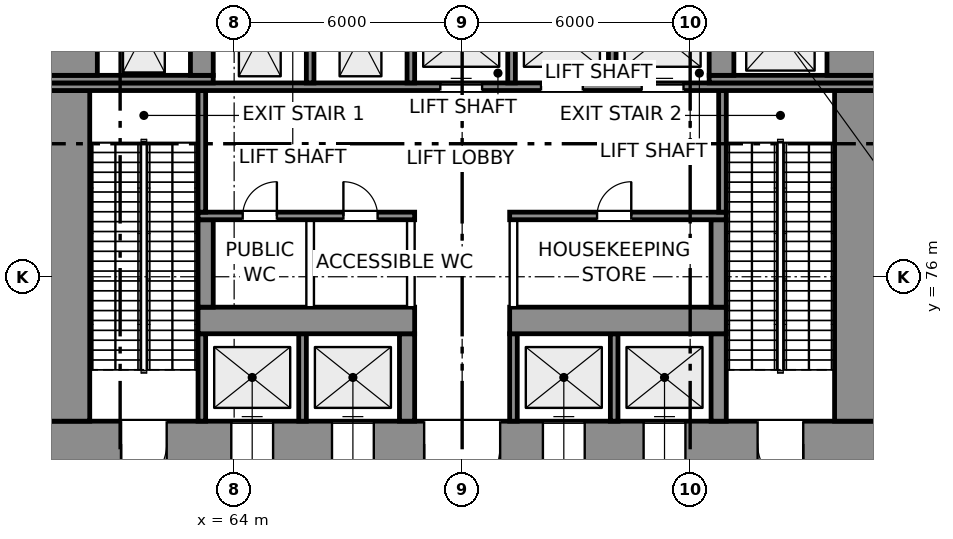
"""IFC4 building model, lengths in metres.
Left out: names, types, materials, properties, quantities, classifications, styles, units other than length and angle.
Written with IfcOpenShell. Run it as: python <this file> out.ifc"""

import sys

from ifc_helpers import new_model, si_unit, direction, frame, frame_2d, origin, place, context, subcontext, project, spatial, rectangle, extrude, element, fill, save


model = new_model("IFC4")
c1 = context("Model", 3, precision=1e-05, world=origin(), true_north=direction((0.0, 1.0)))
c2 = subcontext(c1, "Body", "Model", "MODEL_VIEW")
j1 = project(units=[si_unit("LENGTHUNIT", "METRE"), si_unit("PLANEANGLEUNIT", "RADIAN")], contexts=[c1])
p1 = place(None, origin())
s1 = spatial("IfcSite", under=j1, at=p1, CompositionType="ELEMENT")
p2 = place(p1, origin())
s2 = spatial("IfcBuilding", under=s1, at=p2, CompositionType="ELEMENT")
p3 = place(p2, origin())
s3 = spatial("IfcBuildingStorey", under=s2, at=p3, CompositionType="ELEMENT", Elevation=0.0)
p4 = place(p3, frame((59.0, 71.6, 0.0), z_axis=(0.0, 0.0, 1.0), x_axis=(1.0, 0.0, 0.0)))
e1 = element("IfcWall", 1, at=p4, inside=s3, PredefinedType="SHEAR", context=c2, shape_type="SweptSolid", body=[
    extrude(rectangle(XDim=22.0, YDim=1.2, at=frame_2d((11.0, 0.0))), origin(), (0.0, 0.0, 1.0), 9.0),
])
p5 = place(p4, frame((2.025, 0.0, 0.0)))
e2 = element("IfcOpeningElement", 2, at=p5, cuts=e1, PredefinedType="OPENING", context=c2, shape_type="SweptSolid", body=[
    extrude(rectangle(XDim=1.2, YDim=2.1, at=frame_2d((0.6, 1.05))), frame((0.0, 0.61, 0.0), z_axis=(0.0, -1.0, 0.0), x_axis=(1.0, 0.0, 0.0)), (0.0, 0.0, 1.0), 1.22),
])
p6 = place(p4, frame((18.775, 0.0, 0.0)))
e3 = element("IfcOpeningElement", 3, at=p6, cuts=e1, PredefinedType="OPENING", context=c2, shape_type="SweptSolid", body=[
    extrude(rectangle(XDim=1.2, YDim=2.1, at=frame_2d((0.6, 1.05))), frame((0.0, 0.61, 0.0), z_axis=(0.0, -1.0, 0.0), x_axis=(1.0, 0.0, 0.0)), (0.0, 0.0, 1.0), 1.22),
])
p7 = place(p4, frame((10.0, 0.0, 0.0)))
e4 = element("IfcOpeningElement", 4, at=p7, cuts=e1, PredefinedType="OPENING", context=c2, shape_type="SweptSolid", body=[
    extrude(rectangle(XDim=2.0, YDim=2.1, at=frame_2d((1.0, 1.05))), frame((0.0, 0.61, 0.0), z_axis=(0.0, -1.0, 0.0), x_axis=(1.0, 0.0, 0.0)), (0.0, 0.0, 1.0), 1.22),
])
p8 = place(p4, frame((4.925, 0.0, 0.0)))
e5 = element("IfcOpeningElement", 5, at=p8, cuts=e1, PredefinedType="OPENING", context=c2, shape_type="SweptSolid", body=[
    extrude(rectangle(XDim=1.1, YDim=2.1, at=frame_2d((0.55, 1.05))), frame((0.0, 0.61, 0.0), z_axis=(0.0, -1.0, 0.0), x_axis=(1.0, 0.0, 0.0)), (0.0, 0.0, 1.0), 1.22),
])
p9 = place(p4, frame((7.575, 0.0, 0.0)))
e6 = element("IfcOpeningElement", 6, at=p9, cuts=e1, PredefinedType="OPENING", context=c2, shape_type="SweptSolid", body=[
    extrude(rectangle(XDim=1.1, YDim=2.1, at=frame_2d((0.55, 1.05))), frame((0.0, 0.61, 0.0), z_axis=(0.0, -1.0, 0.0), x_axis=(1.0, 0.0, 0.0)), (0.0, 0.0, 1.0), 1.22),
])
p10 = place(p4, frame((13.125, 0.0, 0.0)))
e7 = element("IfcOpeningElement", 7, at=p10, cuts=e1, PredefinedType="OPENING", context=c2, shape_type="SweptSolid", body=[
    extrude(rectangle(XDim=1.1, YDim=2.1, at=frame_2d((0.55, 1.05))), frame((0.0, 0.61, 0.0), z_axis=(0.0, -1.0, 0.0), x_axis=(1.0, 0.0, 0.0)), (0.0, 0.0, 1.0), 1.22),
])
p11 = place(p4, frame((15.775, 0.0, 0.0)))
e8 = element("IfcOpeningElement", 8, at=p11, cuts=e1, PredefinedType="OPENING", context=c2, shape_type="SweptSolid", body=[
    extrude(rectangle(XDim=1.1, YDim=2.1, at=frame_2d((0.55, 1.05))), frame((0.0, 0.61, 0.0), z_axis=(0.0, -1.0, 0.0), x_axis=(1.0, 0.0, 0.0)), (0.0, 0.0, 1.0), 1.22),
])
p12 = place(p3, frame((59.6, 72.2, 0.0), z_axis=(0.0, 0.0, 1.0), x_axis=(0.0, 1.0, 0.0)))
e9 = element("IfcWall", 9, at=p12, inside=s3, PredefinedType="SHEAR", context=c2, shape_type="SweptSolid", body=[
    extrude(rectangle(XDim=8.7, YDim=1.2, at=frame_2d((4.35, 0.0))), origin(), (0.0, 0.0, 1.0), 9.0),
])
for number, where, z_axis, x_axis in (
    (10, (63.15, 72.2, 0.0), (0.0, 0.0, 1.0), (0.0, 1.0, 0.0)),
    (11, (65.8, 72.2, 0.0), (0.0, 0.0, 1.0), (0.0, 1.0, 0.0)),
):
    element("IfcWall", number, at=place(p3, frame(where, z_axis=z_axis, x_axis=x_axis)), inside=s3, PredefinedType="SHEAR", context=c2, shape_type="SweptSolid", body=[
        extrude(rectangle(XDim=2.3, YDim=0.2, at=frame_2d((1.15, 0.0))), origin(), (0.0, 0.0, 1.0), 9.0),
    ])
p13 = place(p3, frame((68.55, 72.2, 0.0), z_axis=(0.0, 0.0, 1.0), x_axis=(0.0, 1.0, 0.0)))
e12 = element("IfcWall", 12, at=p13, inside=s3, PredefinedType="SHEAR", context=c2, shape_type="SweptSolid", body=[
    extrude(rectangle(XDim=2.3, YDim=0.4, at=frame_2d((1.15, 0.0))), origin(), (0.0, 0.0, 1.0), 9.0),
])
for number, where, z_axis, x_axis in (
    (13, (71.35, 72.2, 0.0), (0.0, 0.0, 1.0), (0.0, 1.0, 0.0)),
    (14, (74.0, 72.2, 0.0), (0.0, 0.0, 1.0), (0.0, 1.0, 0.0)),
):
    element("IfcWall", number, at=place(p3, frame(where, z_axis=z_axis, x_axis=x_axis)), inside=s3, PredefinedType="SHEAR", context=c2, shape_type="SweptSolid", body=[
        extrude(rectangle(XDim=2.3, YDim=0.2, at=frame_2d((1.15, 0.0))), origin(), (0.0, 0.0, 1.0), 9.0),
    ])
p14 = place(p3, frame((76.75, 72.2, 0.0), z_axis=(0.0, 0.0, 1.0), x_axis=(0.0, 1.0, 0.0)))
e15 = element("IfcWall", 15, at=p14, inside=s3, PredefinedType="SHEAR", context=c2, shape_type="SweptSolid", body=[
    extrude(rectangle(XDim=2.3, YDim=0.4, at=frame_2d((1.15, 0.0))), origin(), (0.0, 0.0, 1.0), 9.0),
])
p15 = place(p3, frame((80.4, 72.2, 0.0), z_axis=(0.0, 0.0, 1.0), x_axis=(0.0, 1.0, 0.0)))
e16 = element("IfcWall", 16, at=p15, inside=s3, PredefinedType="SHEAR", context=c2, shape_type="SweptSolid", body=[
    extrude(rectangle(XDim=8.7, YDim=1.2, at=frame_2d((4.35, 0.0))), origin(), (0.0, 0.0, 1.0), 9.0),
])
for number, where, z_axis, x_axis in (
    (17, (63.05, 74.85, 0.0), (0.0, 0.0, 1.0), (1.0, 0.0, 0.0)),
    (18, (71.25, 74.85, 0.0), (0.0, 0.0, 1.0), (1.0, 0.0, 0.0)),
):
    element("IfcWall", number, at=place(p3, frame(where, z_axis=z_axis, x_axis=x_axis)), inside=s3, PredefinedType="SHEAR", context=c2, shape_type="SweptSolid", body=[
        extrude(rectangle(XDim=5.7, YDim=0.7, at=frame_2d((2.85, 0.0))), origin(), (0.0, 0.0, 1.0), 9.0),
    ])
p16 = place(p3, frame((63.25, 75.2, 0.0), z_axis=(0.0, 0.0, 1.0), x_axis=(0.0, 1.0, 0.0)))
e19 = element("IfcWall", 19, at=p16, inside=s3, PredefinedType="SHEAR", context=c2, shape_type="SweptSolid", body=[
    extrude(rectangle(XDim=2.3, YDim=0.4, at=frame_2d((1.15, 0.0))), origin(), (0.0, 0.0, 1.0), 9.0),
])
for number, where, z_axis, x_axis in (
    (20, (66.0, 75.2, 0.0), (0.0, 0.0, 1.0), (0.0, 1.0, 0.0)),
    (21, (68.65, 75.2, 0.0), (0.0, 0.0, 1.0), (0.0, 1.0, 0.0)),
    (22, (71.35, 75.2, 0.0), (0.0, 0.0, 1.0), (0.0, 1.0, 0.0)),
):
    element("IfcWall", number, at=place(p3, frame(where, z_axis=z_axis, x_axis=x_axis)), inside=s3, PredefinedType="PARTITIONING", context=c2, shape_type="SweptSolid", body=[
        extrude(rectangle(XDim=2.3, YDim=0.2, at=frame_2d((1.15, 0.0))), origin(), (0.0, 0.0, 1.0), 8.65),
    ])
p17 = place(p3, frame((76.75, 75.2, 0.0), z_axis=(0.0, 0.0, 1.0), x_axis=(0.0, 1.0, 0.0)))
e23 = element("IfcWall", 23, at=p17, inside=s3, PredefinedType="SHEAR", context=c2, shape_type="SweptSolid", body=[
    extrude(rectangle(XDim=2.3, YDim=0.4, at=frame_2d((1.15, 0.0))), origin(), (0.0, 0.0, 1.0), 9.0),
])
p18 = place(p3, frame((63.05, 77.6, 0.0), z_axis=(0.0, 0.0, 1.0), x_axis=(1.0, 0.0, 0.0)))
e24 = element("IfcWall", 24, at=p18, inside=s3, PredefinedType="SHEAR", context=c2, shape_type="SweptSolid", body=[
    extrude(rectangle(XDim=5.7, YDim=0.2, at=frame_2d((2.85, 0.0))), origin(), (0.0, 0.0, 1.0), 9.0),
])
p19 = place(p18, frame((1.175, 0.0, 0.0)))
e25 = element("IfcOpeningElement", 25, at=p19, cuts=e24, PredefinedType="OPENING", context=c2, shape_type="SweptSolid", body=[
    extrude(rectangle(XDim=0.9, YDim=2.1, at=frame_2d((0.45, 1.05))), frame((0.0, 0.11, 0.0), z_axis=(0.0, -1.0, 0.0), x_axis=(1.0, 0.0, 0.0)), (0.0, 0.0, 1.0), 0.22),
])
p20 = place(p18, frame((3.825, 0.0, 0.0)))
e26 = element("IfcOpeningElement", 26, at=p20, cuts=e24, PredefinedType="OPENING", context=c2, shape_type="SweptSolid", body=[
    extrude(rectangle(XDim=0.9, YDim=2.1, at=frame_2d((0.45, 1.05))), frame((0.0, 0.11, 0.0), z_axis=(0.0, -1.0, 0.0), x_axis=(1.0, 0.0, 0.0)), (0.0, 0.0, 1.0), 0.22),
])
p21 = place(p3, frame((71.25, 77.6, 0.0), z_axis=(0.0, 0.0, 1.0), x_axis=(1.0, 0.0, 0.0)))
e27 = element("IfcWall", 27, at=p21, inside=s3, PredefinedType="SHEAR", context=c2, shape_type="SweptSolid", body=[
    extrude(rectangle(XDim=5.7, YDim=0.2, at=frame_2d((2.85, 0.0))), origin(), (0.0, 0.0, 1.0), 9.0),
])
p22 = place(p21, frame((2.3, 0.0, 0.0)))
e28 = element("IfcOpeningElement", 28, at=p22, cuts=e27, PredefinedType="OPENING", context=c2, shape_type="SweptSolid", body=[
    extrude(rectangle(XDim=0.9, YDim=2.1, at=frame_2d((0.45, 1.05))), frame((0.0, 0.11, 0.0), z_axis=(0.0, -1.0, 0.0), x_axis=(1.0, 0.0, 0.0)), (0.0, 0.0, 1.0), 0.22),
])
for number, where, z_axis, x_axis in (
    (29, (63.15, 77.7, 0.0), (0.0, 0.0, 1.0), (0.0, 1.0, 0.0)),
    (30, (76.85, 77.7, 0.0), (0.0, 0.0, 1.0), (0.0, 1.0, 0.0)),
):
    element("IfcWall", number, at=place(p3, frame(where, z_axis=z_axis, x_axis=x_axis)), inside=s3, PredefinedType="SHEAR", context=c2, shape_type="SweptSolid", body=[
        extrude(rectangle(XDim=3.2, YDim=0.2, at=frame_2d((1.6, 0.0))), origin(), (0.0, 0.0, 1.0), 9.0),
    ])
p23 = place(p3, frame((59.0, 81.0, 0.0), z_axis=(0.0, 0.0, 1.0), x_axis=(1.0, 0.0, 0.0)))
e31 = element("IfcWall", 31, at=p23, inside=s3, PredefinedType="SHEAR", context=c2, shape_type="SweptSolid", body=[
    extrude(rectangle(XDim=22.0, YDim=0.2, at=frame_2d((11.0, 0.0))), origin(), (0.0, 0.0, 1.0), 9.0),
])
p24 = place(p23, frame((10.425, 0.0, 0.0)))
e32 = element("IfcOpeningElement", 32, at=p24, cuts=e31, PredefinedType="OPENING", context=c2, shape_type="SweptSolid", body=[
    extrude(rectangle(XDim=1.1, YDim=2.1, at=frame_2d((0.55, 1.05))), frame((0.0, 0.11, 0.0), z_axis=(0.0, -1.0, 0.0), x_axis=(1.0, 0.0, 0.0)), (0.0, 0.0, 1.0), 0.22),
])
p25 = place(p23, frame((13.075, 0.0, 0.0)))
e33 = element("IfcOpeningElement", 33, at=p25, cuts=e31, PredefinedType="OPENING", context=c2, shape_type="SweptSolid", body=[
    extrude(rectangle(XDim=1.1, YDim=2.1, at=frame_2d((0.55, 1.05))), frame((0.0, 0.11, 0.0), z_axis=(0.0, -1.0, 0.0), x_axis=(1.0, 0.0, 0.0)), (0.0, 0.0, 1.0), 0.22),
])
p26 = place(p23, frame((15.725, 0.0, 0.0)))
e34 = element("IfcOpeningElement", 34, at=p26, cuts=e31, PredefinedType="OPENING", context=c2, shape_type="SweptSolid", body=[
    extrude(rectangle(XDim=1.1, YDim=2.1, at=frame_2d((0.55, 1.05))), frame((0.0, 0.11, 0.0), z_axis=(0.0, -1.0, 0.0), x_axis=(1.0, 0.0, 0.0)), (0.0, 0.0, 1.0), 0.22),
])
p27 = place(p3, frame((59.0, 81.2, 0.0), z_axis=(0.0, 0.0, 1.0), x_axis=(1.0, 0.0, 0.0)))
e35 = element("IfcWall", 35, at=p27, inside=s3, PredefinedType="SHEAR", context=c2, shape_type="SweptSolid", body=[
    extrude(rectangle(XDim=4.45, YDim=0.2, at=frame_2d((2.225, 0.0))), origin(), (0.0, 0.0, 1.0), 9.0),
])
for number, where, z_axis, x_axis in (
    (36, (66.0, 81.1, 0.0), (0.0, 0.0, 1.0), (0.0, 1.0, 0.0)),
    (37, (68.65, 81.1, 0.0), (0.0, 0.0, 1.0), (0.0, 1.0, 0.0)),
    (38, (71.3, 81.1, 0.0), (0.0, 0.0, 1.0), (0.0, 1.0, 0.0)),
    (39, (73.95, 81.1, 0.0), (0.0, 0.0, 1.0), (0.0, 1.0, 0.0)),
):
    element("IfcWall", number, at=place(p3, frame(where, z_axis=z_axis, x_axis=x_axis)), inside=s3, PredefinedType="SHEAR", context=c2, shape_type="SweptSolid", body=[
        extrude(rectangle(XDim=2.45, YDim=0.2, at=frame_2d((1.225, 0.0))), origin(), (0.0, 0.0, 1.0), 9.0),
    ])
p28 = place(p3, frame((76.5, 81.2, 0.0), z_axis=(0.0, 0.0, 1.0), x_axis=(1.0, 0.0, 0.0)))
e40 = element("IfcWall", 40, at=p28, inside=s3, PredefinedType="SHEAR", context=c2, shape_type="SweptSolid", body=[
    extrude(rectangle(XDim=4.5, YDim=0.2, at=frame_2d((2.25, 0.0))), origin(), (0.0, 0.0, 1.0), 9.0),
])
p29 = place(p3, frame((59.7, 81.3, 0.0), z_axis=(0.0, 0.0, 1.0), x_axis=(0.0, 1.0, 0.0)))
e41 = element("IfcWall", 41, at=p29, inside=s3, PredefinedType="SHEAR", context=c2, shape_type="SweptSolid", body=[
    extrude(rectangle(XDim=2.25, YDim=1.4, at=frame_2d((1.125, 0.0))), origin(), (0.0, 0.0, 1.0), 9.0),
])
p30 = place(p3, frame((63.15, 81.3, 0.0), z_axis=(0.0, 0.0, 1.0), x_axis=(0.0, 1.0, 0.0)))
e42 = element("IfcWall", 42, at=p30, inside=s3, PredefinedType="SHEAR", context=c2, shape_type="SweptSolid", body=[
    extrude(rectangle(XDim=2.25, YDim=0.6, at=frame_2d((1.125, 0.0))), origin(), (0.0, 0.0, 1.0), 9.0),
])
p31 = place(p3, frame((76.825, 81.3, 0.0), z_axis=(0.0, 0.0, 1.0), x_axis=(0.0, 1.0, 0.0)))
e43 = element("IfcWall", 43, at=p31, inside=s3, PredefinedType="SHEAR", context=c2, shape_type="SweptSolid", body=[
    extrude(rectangle(XDim=2.25, YDim=0.65, at=frame_2d((1.125, 0.0))), origin(), (0.0, 0.0, 1.0), 9.0),
])
p32 = place(p3, frame((80.3, 81.3, 0.0), z_axis=(0.0, 0.0, 1.0), x_axis=(0.0, 1.0, 0.0)))
e44 = element("IfcWall", 44, at=p32, inside=s3, PredefinedType="SHEAR", context=c2, shape_type="SweptSolid", body=[
    extrude(rectangle(XDim=2.25, YDim=1.4, at=frame_2d((1.125, 0.0))), origin(), (0.0, 0.0, 1.0), 9.0),
])
p33 = place(p5, frame((1.2, 0.0, 0.0), z_axis=(0.0, 0.0, 1.0), x_axis=(-1.0, 0.0, 0.0)))
e45 = element("IfcDoor", 45, at=p33, inside=s3, OperationType="SINGLE_SWING_RIGHT", PredefinedType="DOOR", context=c2, shape_type="SweptSolid", body=[
    extrude(rectangle(XDim=1.2, YDim=2.1, at=frame_2d((0.6, 1.05))), frame((0.0, 0.025, 0.0), z_axis=(0.0, -1.0, 0.0), x_axis=(1.0, 0.0, 0.0)), (0.0, 0.0, 1.0), 0.05),
])
fill(e2, e45)
p34 = place(p6, frame((1.2, 0.0, 0.0), z_axis=(0.0, 0.0, 1.0), x_axis=(-1.0, 0.0, 0.0)))
e46 = element("IfcDoor", 46, at=p34, inside=s3, OperationType="SINGLE_SWING_LEFT", PredefinedType="DOOR", context=c2, shape_type="SweptSolid", body=[
    extrude(rectangle(XDim=1.2, YDim=2.1, at=frame_2d((0.6, 1.05))), frame((0.0, 0.025, 0.0), z_axis=(0.0, -1.0, 0.0), x_axis=(1.0, 0.0, 0.0)), (0.0, 0.0, 1.0), 0.05),
])
fill(e3, e46)
p35 = place(p7, frame((2.0, 0.0, 0.0), z_axis=(0.0, 0.0, 1.0), x_axis=(-1.0, 0.0, 0.0)))
e47 = element("IfcDoor", 47, at=p35, inside=s3, OperationType="DOUBLE_DOOR_SINGLE_SWING", PredefinedType="DOOR", context=c2, shape_type="SweptSolid", body=[
    extrude(rectangle(XDim=2.0, YDim=2.1, at=frame_2d((1.0, 1.05))), frame((0.0, 0.025, 0.0), z_axis=(0.0, -1.0, 0.0), x_axis=(1.0, 0.0, 0.0)), (0.0, 0.0, 1.0), 0.05),
])
fill(e4, e47)
p36 = place(p24, origin())
e48 = element("IfcDoor", 48, at=p36, inside=s3, OperationType="DOUBLE_DOOR_SLIDING", PredefinedType="DOOR", context=c2, shape_type="SweptSolid", body=[
    extrude(rectangle(XDim=1.1, YDim=2.1, at=frame_2d((0.55, 1.05))), frame((0.0, 0.025, 0.0), z_axis=(0.0, -1.0, 0.0), x_axis=(1.0, 0.0, 0.0)), (0.0, 0.0, 1.0), 0.05),
])
fill(e32, e48)
p37 = place(p25, origin())
e49 = element("IfcDoor", 49, at=p37, inside=s3, OperationType="DOUBLE_DOOR_SLIDING", PredefinedType="DOOR", context=c2, shape_type="SweptSolid", body=[
    extrude(rectangle(XDim=1.1, YDim=2.1, at=frame_2d((0.55, 1.05))), frame((0.0, 0.025, 0.0), z_axis=(0.0, -1.0, 0.0), x_axis=(1.0, 0.0, 0.0)), (0.0, 0.0, 1.0), 0.05),
])
fill(e33, e49)
p38 = place(p26, origin())
e50 = element("IfcDoor", 50, at=p38, inside=s3, OperationType="DOUBLE_DOOR_SLIDING", PredefinedType="DOOR", context=c2, shape_type="SweptSolid", body=[
    extrude(rectangle(XDim=1.1, YDim=2.1, at=frame_2d((0.55, 1.05))), frame((0.0, 0.025, 0.0), z_axis=(0.0, -1.0, 0.0), x_axis=(1.0, 0.0, 0.0)), (0.0, 0.0, 1.0), 0.05),
])
fill(e34, e50)
p39 = place(p8, origin())
e51 = element("IfcDoor", 51, at=p39, inside=s3, OperationType="DOUBLE_DOOR_SLIDING", PredefinedType="DOOR", context=c2, shape_type="SweptSolid", body=[
    extrude(rectangle(XDim=1.1, YDim=2.1, at=frame_2d((0.55, 1.05))), frame((0.0, 0.025, 0.0), z_axis=(0.0, -1.0, 0.0), x_axis=(1.0, 0.0, 0.0)), (0.0, 0.0, 1.0), 0.05),
])
fill(e5, e51)
p40 = place(p9, origin())
e52 = element("IfcDoor", 52, at=p40, inside=s3, OperationType="DOUBLE_DOOR_SLIDING", PredefinedType="DOOR", context=c2, shape_type="SweptSolid", body=[
    extrude(rectangle(XDim=1.1, YDim=2.1, at=frame_2d((0.55, 1.05))), frame((0.0, 0.025, 0.0), z_axis=(0.0, -1.0, 0.0), x_axis=(1.0, 0.0, 0.0)), (0.0, 0.0, 1.0), 0.05),
])
fill(e6, e52)
p41 = place(p10, origin())
e53 = element("IfcDoor", 53, at=p41, inside=s3, OperationType="DOUBLE_DOOR_SLIDING", PredefinedType="DOOR", context=c2, shape_type="SweptSolid", body=[
    extrude(rectangle(XDim=1.1, YDim=2.1, at=frame_2d((0.55, 1.05))), frame((0.0, 0.025, 0.0), z_axis=(0.0, -1.0, 0.0), x_axis=(1.0, 0.0, 0.0)), (0.0, 0.0, 1.0), 0.05),
])
fill(e7, e53)
p42 = place(p11, origin())
e54 = element("IfcDoor", 54, at=p42, inside=s3, OperationType="DOUBLE_DOOR_SLIDING", PredefinedType="DOOR", context=c2, shape_type="SweptSolid", body=[
    extrude(rectangle(XDim=1.1, YDim=2.1, at=frame_2d((0.55, 1.05))), frame((0.0, 0.025, 0.0), z_axis=(0.0, -1.0, 0.0), x_axis=(1.0, 0.0, 0.0)), (0.0, 0.0, 1.0), 0.05),
])
fill(e8, e54)
p43 = place(p19, origin())
e55 = element("IfcDoor", 55, at=p43, inside=s3, OperationType="SINGLE_SWING_RIGHT", PredefinedType="DOOR", context=c2, shape_type="SweptSolid", body=[
    extrude(rectangle(XDim=0.9, YDim=2.1, at=frame_2d((0.45, 1.05))), frame((0.0, 0.025, 0.0), z_axis=(0.0, -1.0, 0.0), x_axis=(1.0, 0.0, 0.0)), (0.0, 0.0, 1.0), 0.05),
])
fill(e25, e55)
p44 = place(p20, origin())
e56 = element("IfcDoor", 56, at=p44, inside=s3, OperationType="SINGLE_SWING_LEFT", PredefinedType="DOOR", context=c2, shape_type="SweptSolid", body=[
    extrude(rectangle(XDim=0.9, YDim=2.1, at=frame_2d((0.45, 1.05))), frame((0.0, 0.025, 0.0), z_axis=(0.0, -1.0, 0.0), x_axis=(1.0, 0.0, 0.0)), (0.0, 0.0, 1.0), 0.05),
])
fill(e26, e56)
p45 = place(p22, origin())
e57 = element("IfcDoor", 57, at=p45, inside=s3, OperationType="SINGLE_SWING_RIGHT", PredefinedType="DOOR", context=c2, shape_type="SweptSolid", body=[
    extrude(rectangle(XDim=0.9, YDim=2.1, at=frame_2d((0.45, 1.05))), frame((0.0, 0.025, 0.0), z_axis=(0.0, -1.0, 0.0), x_axis=(1.0, 0.0, 0.0)), (0.0, 0.0, 1.0), 0.05),
])
fill(e28, e57)
save(model, sys.argv[1])
